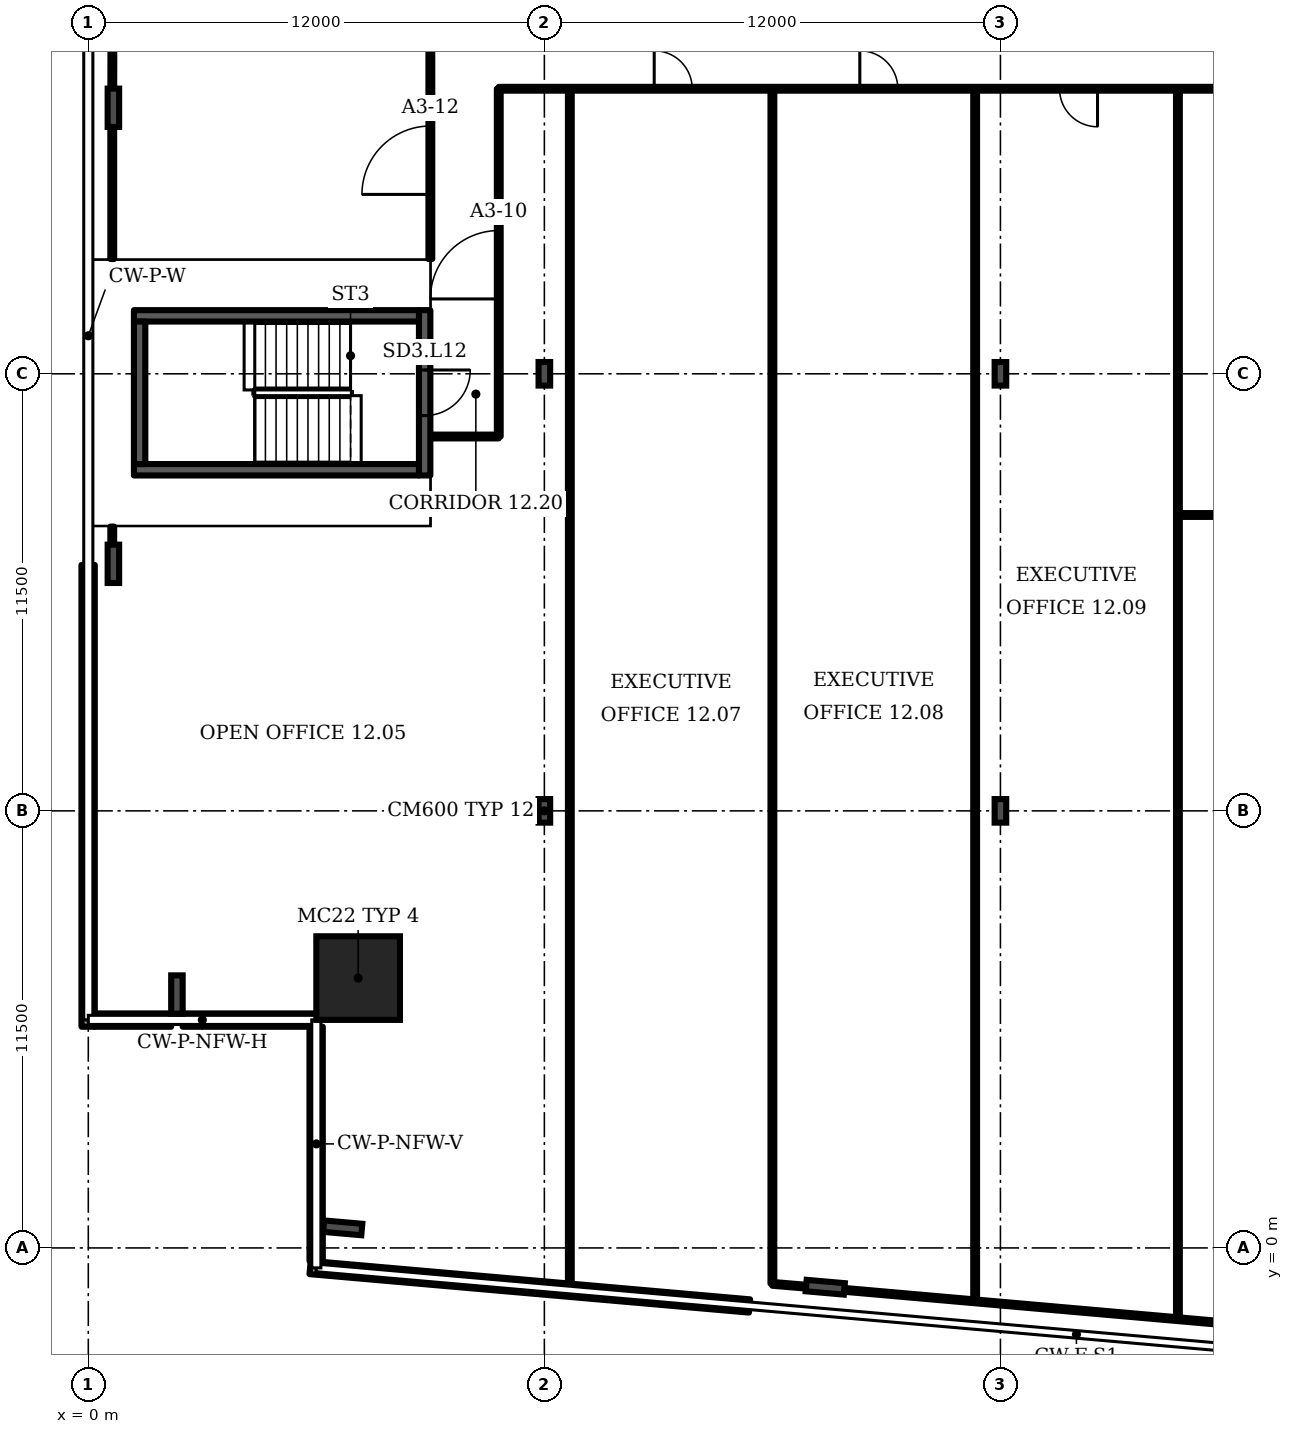
"""IFC4 building model, lengths in metres.
Left out: names, types, materials, properties, quantities, classifications, styles, units other than length and angle.
Written with IfcOpenShell. Run it as: python <this file> out.ifc"""

import sys

from ifc_helpers import new_model, si_unit, direction, frame, frame_2d, origin, origin_2d, place, context, subcontext, project, spatial, rectangle, i_section, extrude, element, fill, save


model = new_model("IFC4")
c1 = context("Model", 3, precision=1e-05, world=origin(), true_north=direction((0.0, 1.0)))
c2 = subcontext(c1, "Body", "Model", "MODEL_VIEW")
j1 = project(units=[si_unit("LENGTHUNIT", "METRE"), si_unit("PLANEANGLEUNIT", "RADIAN")], contexts=[c1])
p1 = place(None, origin())
s1 = spatial("IfcSite", under=j1, at=p1, CompositionType="ELEMENT")
p2 = place(p1, origin())
s2 = spatial("IfcBuilding", under=s1, at=p2, CompositionType="ELEMENT")
p3 = place(p2, frame((0.0, 0.0, 63.1)))
s3 = spatial("IfcBuildingStorey", under=s2, at=p3, CompositionType="ELEMENT", Elevation=63.1)
p4 = place(p3, frame((7.1, 7.1, 0.0), z_axis=(0.0, 0.0, 1.0), x_axis=(1.0, 0.0, 0.0)))
e1 = element("IfcColumn", 1, at=p4, inside=s3, PredefinedType="COLUMN", context=c2, shape_type="SweptSolid", body=[
    extrude(rectangle(XDim=2.2, YDim=2.2, at=origin_2d()), origin(), (0.0, 0.0, 1.0), 3.6),
])
for number, where, z_axis, x_axis in (
    (2, (6.694, 0.529, 0.0), (0.0, 0.0, 1.0), (-0.087, -0.996, 0.0)),
    (3, (19.391, -1.034, 0.0), (0.0, 0.0, 1.0), (-0.087, -0.996, 0.0)),
    (4, (0.66, 30.0, 0.0), (0.0, 0.0, 1.0), (-1.0, 0.0, 0.0)),
    (5, (0.66, 18.0, 0.0), (0.0, 0.0, 1.0), (-1.0, 0.0, 0.0)),
    (6, (2.332, 6.667, 0.0), (0.0, 0.0, 1.0), (-1.0, 0.0, 0.0)),
):
    element("IfcColumn", number, at=place(p3, frame(where, z_axis=z_axis, x_axis=x_axis)), inside=s3, PredefinedType="COLUMN", context=c2, shape_type="SweptSolid", body=[
        extrude(i_section(OverallWidth=0.302, OverallDepth=1.008, WebThickness=0.021, FlangeThickness=0.04, FilletRadius=0.03, at=origin_2d()), origin(), (0.0, 0.0, 1.0), 3.6),
    ])
for number, where, z_axis, x_axis in (
    (7, (12.0, 11.5, 0.0), (0.0, 0.0, 1.0), (1.0, 0.0, 0.0)),
    (8, (24.0, 11.5, 0.0), (0.0, 0.0, 1.0), (1.0, 0.0, 0.0)),
    (9, (12.0, 23.0, 0.0), (0.0, 0.0, 1.0), (1.0, 0.0, 0.0)),
    (10, (24.0, 23.0, 0.0), (0.0, 0.0, 1.0), (1.0, 0.0, 0.0)),
):
    element("IfcColumn", number, at=place(p3, frame(where, z_axis=z_axis, x_axis=x_axis)), inside=s3, PredefinedType="COLUMN", context=c2, shape_type="SweptSolid", body=[
        extrude(i_section(OverallWidth=0.305, OverallDepth=0.62, WebThickness=0.021, FlangeThickness=0.04, FilletRadius=0.027, at=origin_2d()), origin(), (0.0, 0.0, 1.0), 3.6),
    ])
p5 = place(p3, frame((5.835, -0.516, 0.0), z_axis=(0.0, 0.0, 1.0), x_axis=(0.996192, -0.087142, 0.0)))
e11 = element("IfcWall", 11, at=p5, inside=s3, PredefinedType="SOLIDWALL", context=c2, shape_type="SweptSolid", body=[
    extrude(rectangle(XDim=11.607, YDim=0.35, at=frame_2d((5.804, 0.0))), origin(), (0.0, 0.0, 1.0), 1.0),
])
p6 = place(p3, frame((-0.005, 17.97, 0.0), z_axis=(0.0, 0.0, 1.0), x_axis=(0.0, -1.0, 0.0)))
e12 = element("IfcWall", 12, at=p6, inside=s3, PredefinedType="SOLIDWALL", context=c2, shape_type="SweptSolid", body=[
    extrude(rectangle(XDim=12.15, YDim=0.35, at=frame_2d((6.075, 0.0))), origin(), (0.0, 0.0, 1.0), 1.0),
])
p7 = place(p3, frame((0.17, 5.995, 0.0), z_axis=(0.0, 0.0, 1.0), x_axis=(1.0, 0.0, 0.0)))
e13 = element("IfcWall", 13, at=p7, inside=s3, PredefinedType="SOLIDWALL", context=c2, shape_type="SweptSolid", body=[
    extrude(rectangle(XDim=2.011, YDim=0.35, at=frame_2d((1.005, 0.0))), origin(), (0.0, 0.0, 1.0), 1.0),
])
p8 = place(p3, frame((2.483, 5.995, 0.0), z_axis=(0.0, 0.0, 1.0), x_axis=(1.0, 0.0, 0.0)))
e14 = element("IfcWall", 14, at=p8, inside=s3, PredefinedType="SOLIDWALL", context=c2, shape_type="SweptSolid", body=[
    extrude(rectangle(XDim=3.517, YDim=0.35, at=frame_2d((1.759, 0.0))), origin(), (0.0, 0.0, 1.0), 1.0),
])
p9 = place(p3, frame((5.995, 5.82, 0.0), z_axis=(0.0, 0.0, 1.0), x_axis=(0.0, -1.0, 0.0)))
e15 = element("IfcWall", 15, at=p9, inside=s3, PredefinedType="SOLIDWALL", context=c2, shape_type="SweptSolid", body=[
    extrude(rectangle(XDim=6.161, YDim=0.35, at=frame_2d((3.081, 0.0))), origin(), (0.0, 0.0, 1.0), 1.0),
])
p10 = place(p3, frame((8.85, 20.325, 0.0), z_axis=(0.0, 0.0, 1.0), x_axis=(0.0, 1.0, 0.0)))
e16 = element("IfcWall", 16, at=p10, inside=s3, PredefinedType="SHEAR", context=c2, shape_type="SweptSolid", body=[
    extrude(rectangle(XDim=4.35, YDim=0.3, at=frame_2d((2.175, 0.0))), origin(), (0.0, 0.0, 1.0), 3.2),
])
p11 = place(p10, frame((1.575, 0.0, 0.0)))
e17 = element("IfcOpeningElement", 17, at=p11, cuts=e16, PredefinedType="OPENING", context=c2, shape_type="SweptSolid", body=[
    extrude(rectangle(XDim=1.2, YDim=2.1, at=frame_2d((0.6, 1.05))), frame((0.0, 0.16, 0.0), z_axis=(0.0, -1.0, 0.0), x_axis=(1.0, 0.0, 0.0)), (0.0, 0.0, 1.0), 0.32),
])
p12 = place(p3, frame((0.63, 17.5, 0.0), z_axis=(0.0, 0.0, 1.0), x_axis=(0.0, 1.0, 0.0)))
e18 = element("IfcWall", 18, at=p12, inside=s3, PredefinedType="PARTITIONING", context=c2, shape_type="SweptSolid", body=[
    extrude(rectangle(XDim=1.48, YDim=0.1, at=frame_2d((0.74, 0.0))), origin(), (0.0, 0.0, 1.0), 2.58),
])
p13 = place(p3, frame((0.63, 26.02, 0.0), z_axis=(0.0, 0.0, 1.0), x_axis=(0.0, 1.0, 0.0)))
e19 = element("IfcWall", 19, at=p13, inside=s3, PredefinedType="PARTITIONING", context=c2, shape_type="SweptSolid", body=[
    extrude(rectangle(XDim=3.98, YDim=0.1, at=frame_2d((1.99, 0.0))), origin(), (0.0, 0.0, 1.0), 2.58),
])
p14 = place(p3, frame((0.63, 30.0, 0.0), z_axis=(0.0, 0.0, 1.0), x_axis=(0.00218, 0.999994, 0.0)))
e20 = element("IfcWall", 20, at=p14, inside=s3, PredefinedType="PARTITIONING", context=c2, shape_type="SweptSolid", body=[
    extrude(rectangle(XDim=11.535, YDim=0.1, at=frame_2d((5.768, 0.0))), origin(), (0.0, 0.0, 1.0), 2.58),
])
p15 = place(p3, frame((9.0, 26.02, 0.0), z_axis=(0.0, 0.0, 1.0), x_axis=(0.0, 1.0, 0.0)))
e21 = element("IfcWall", 21, at=p15, inside=s3, PredefinedType="PARTITIONING", context=c2, shape_type="SweptSolid", body=[
    extrude(rectangle(XDim=7.96, YDim=0.1, at=frame_2d((3.98, 0.0))), origin(), (0.0, 0.0, 1.0), 3.2),
])
p16 = place(p15, frame((1.7, 0.0, 0.0)))
e22 = element("IfcOpeningElement", 22, at=p16, cuts=e21, PredefinedType="OPENING", context=c2, shape_type="SweptSolid", body=[
    extrude(rectangle(XDim=1.8, YDim=2.1, at=frame_2d((0.9, 1.05))), frame((0.0, 0.06, 0.0), z_axis=(0.0, -1.0, 0.0), x_axis=(1.0, 0.0, 0.0)), (0.0, 0.0, 1.0), 0.12),
])
p17 = place(p3, frame((9.02, 21.35, 0.0), z_axis=(0.0, 0.0, 1.0), x_axis=(1.0, 0.0, 0.0)))
e23 = element("IfcWall", 23, at=p17, inside=s3, PredefinedType="PARTITIONING", context=c2, shape_type="SweptSolid", body=[
    extrude(rectangle(XDim=1.78, YDim=0.1, at=frame_2d((0.89, 0.0))), origin(), (0.0, 0.0, 1.0), 3.2),
])
p18 = place(p3, frame((10.8, 21.35, 0.0), z_axis=(0.0, 0.0, 1.0), x_axis=(0.0, 1.0, 0.0)))
e24 = element("IfcWall", 24, at=p18, inside=s3, PredefinedType="PARTITIONING", context=c2, shape_type="SweptSolid", body=[
    extrude(rectangle(XDim=9.15, YDim=0.1, at=frame_2d((4.575, 0.0))), origin(), (0.0, 0.0, 1.0), 3.2),
])
p19 = place(p18, frame((3.62, 0.0, 0.0)))
e25 = element("IfcOpeningElement", 25, at=p19, cuts=e24, PredefinedType="OPENING", context=c2, shape_type="SweptSolid", body=[
    extrude(rectangle(XDim=1.8, YDim=2.1, at=frame_2d((0.9, 1.05))), frame((0.0, 0.06, 0.0), z_axis=(0.0, -1.0, 0.0), x_axis=(1.0, 0.0, 0.0)), (0.0, 0.0, 1.0), 0.12),
])
p20 = place(p3, frame((10.8, 30.5, 0.0), z_axis=(0.0, 0.0, 1.0), x_axis=(1.0, 0.0, 0.0)))
e26 = element("IfcWall", 26, at=p20, inside=s3, PredefinedType="PARTITIONING", context=c2, shape_type="SweptSolid", body=[
    extrude(rectangle(XDim=26.05, YDim=0.1, at=frame_2d((13.025, 0.0))), origin(), (0.0, 0.0, 1.0), 3.2),
])
p21 = place(p20, frame((4.09, 0.0, 0.0)))
e27 = element("IfcOpeningElement", 27, at=p21, cuts=e26, PredefinedType="OPENING", context=c2, shape_type="SweptSolid", body=[
    extrude(rectangle(XDim=1.0, YDim=2.1, at=frame_2d((0.5, 1.05))), frame((0.0, 0.06, 0.0), z_axis=(0.0, -1.0, 0.0), x_axis=(1.0, 0.0, 0.0)), (0.0, 0.0, 1.0), 0.12),
])
p22 = place(p20, frame((9.5, 0.0, 0.0)))
e28 = element("IfcOpeningElement", 28, at=p22, cuts=e26, PredefinedType="OPENING", context=c2, shape_type="SweptSolid", body=[
    extrude(rectangle(XDim=1.0, YDim=2.1, at=frame_2d((0.5, 1.05))), frame((0.0, 0.06, 0.0), z_axis=(0.0, -1.0, 0.0), x_axis=(1.0, 0.0, 0.0)), (0.0, 0.0, 1.0), 0.12),
])
p23 = place(p20, frame((14.755, 0.0, 0.0)))
e29 = element("IfcOpeningElement", 29, at=p23, cuts=e26, PredefinedType="OPENING", context=c2, shape_type="SweptSolid", body=[
    extrude(rectangle(XDim=1.0, YDim=2.1, at=frame_2d((0.5, 1.05))), frame((0.0, 0.06, 0.0), z_axis=(0.0, -1.0, 0.0), x_axis=(1.0, 0.0, 0.0)), (0.0, 0.0, 1.0), 0.12),
])
p24 = place(p20, frame((21.49, 0.0, 0.0)))
e30 = element("IfcOpeningElement", 30, at=p24, cuts=e26, PredefinedType="OPENING", context=c2, shape_type="SweptSolid", body=[
    extrude(rectangle(XDim=1.0, YDim=2.1, at=frame_2d((0.5, 1.05))), frame((0.0, 0.06, 0.0), z_axis=(0.0, -1.0, 0.0), x_axis=(1.0, 0.0, 0.0)), (0.0, 0.0, 1.0), 0.12),
])
p25 = place(p3, frame((12.67, -1.088, 0.0), z_axis=(0.0, 0.0, 1.0), x_axis=(0.0, 1.0, 0.0)))
e31 = element("IfcWall", 31, at=p25, inside=s3, PredefinedType="PARTITIONING", context=c2, shape_type="SweptSolid", body=[
    extrude(rectangle(XDim=31.588, YDim=0.1, at=frame_2d((15.794, 0.0))), origin(), (0.0, 0.0, 1.0), 3.2),
])
p26 = place(p3, frame((18.0, -0.94, 0.0), z_axis=(0.0, 0.0, 1.0), x_axis=(0.0, 1.0, 0.0)))
e32 = element("IfcWall", 32, at=p26, inside=s3, PredefinedType="PARTITIONING", context=c2, shape_type="SweptSolid", body=[
    extrude(rectangle(XDim=31.44, YDim=0.1, at=frame_2d((15.72, 0.0))), origin(), (0.0, 0.0, 1.0), 3.2),
])
p27 = place(p3, frame((18.89, -1.02, 0.0), z_axis=(0.0, 0.0, 1.0), x_axis=(-0.996474, 0.083928, 0.0)))
e33 = element("IfcWall", 33, at=p27, inside=s3, PredefinedType="PARTITIONING", context=c2, shape_type="SweptSolid", body=[
    extrude(rectangle(XDim=0.893, YDim=0.1, at=frame_2d((0.447, 0.0))), origin(), (0.0, 0.0, 1.0), 3.2),
])
p28 = place(p3, frame((23.335, -1.41, 0.0), z_axis=(0.0, 0.0, 1.0), x_axis=(0.0, 1.0, 0.0)))
e34 = element("IfcWall", 34, at=p28, inside=s3, PredefinedType="PARTITIONING", context=c2, shape_type="SweptSolid", body=[
    extrude(rectangle(XDim=31.91, YDim=0.1, at=frame_2d((15.955, 0.0))), origin(), (0.0, 0.0, 1.0), 3.2),
])
p29 = place(p3, frame((28.67, -1.875, 0.0), z_axis=(0.0, 0.0, 1.0), x_axis=(0.0, 1.0, 0.0)))
e35 = element("IfcWall", 35, at=p29, inside=s3, PredefinedType="PARTITIONING", context=c2, shape_type="SweptSolid", body=[
    extrude(rectangle(XDim=32.375, YDim=0.1, at=frame_2d((16.188, 0.0))), origin(), (0.0, 0.0, 1.0), 3.2),
])
p30 = place(p3, frame((28.67, 19.285, 0.0), z_axis=(0.0, 0.0, 1.0), x_axis=(1.0, 0.0, 0.0)))
e36 = element("IfcWall", 36, at=p30, inside=s3, PredefinedType="PARTITIONING", context=c2, shape_type="SweptSolid", body=[
    extrude(rectangle(XDim=9.81, YDim=0.1, at=frame_2d((4.905, 0.0))), origin(), (0.0, 0.0, 1.0), 3.2),
])
p31 = place(p3, frame((33.22, -2.275, 0.0), z_axis=(0.0, 0.0, 1.0), x_axis=(-0.99616, 0.087559, 0.0)))
e37 = element("IfcWall", 37, at=p31, inside=s3, PredefinedType="PARTITIONING", context=c2, shape_type="SweptSolid", body=[
    extrude(rectangle(XDim=14.385, YDim=0.1, at=frame_2d((7.192, 0.0))), origin(), (0.0, 0.0, 1.0), 2.58),
])
for number, where, z_axis, x_axis in (
    (38, (1.2, 20.475, 0.0), (0.0, 0.0, 1.0), (1.0, 0.0, 0.0)),
    (39, (1.2, 24.525, 0.0), (0.0, 0.0, 1.0), (1.0, 0.0, 0.0)),
):
    element("IfcWall", number, at=place(p3, frame(where, z_axis=z_axis, x_axis=x_axis)), inside=s3, PredefinedType="SHEAR", context=c2, shape_type="SweptSolid", body=[
        extrude(rectangle(XDim=7.5, YDim=0.3, at=frame_2d((3.75, 0.0))), origin(), (0.0, 0.0, 1.0), 3.2),
    ])
p32 = place(p3, frame((1.35, 20.625, 0.0), z_axis=(0.0, 0.0, 1.0), x_axis=(0.0, 1.0, 0.0)))
e40 = element("IfcWall", 40, at=p32, inside=s3, PredefinedType="SHEAR", context=c2, shape_type="SweptSolid", body=[
    extrude(rectangle(XDim=3.75, YDim=0.3, at=frame_2d((1.875, 0.0))), origin(), (0.0, 0.0, 1.0), 3.2),
])
p33 = place(p11, origin())
e41 = element("IfcDoor", 41, at=p33, inside=s3, OperationType="SINGLE_SWING_RIGHT", PredefinedType="DOOR", context=c2, shape_type="SweptSolid", body=[
    extrude(rectangle(XDim=1.2, YDim=2.1, at=frame_2d((0.6, 1.05))), frame((0.0, 0.025, 0.0), z_axis=(0.0, -1.0, 0.0), x_axis=(1.0, 0.0, 0.0)), (0.0, 0.0, 1.0), 0.05),
])
fill(e17, e41)
p34 = place(p19, origin())
e42 = element("IfcDoor", 42, at=p34, inside=s3, OperationType="DOUBLE_DOOR_SINGLE_SWING", PredefinedType="DOOR", context=c2, shape_type="SweptSolid", body=[
    extrude(rectangle(XDim=1.8, YDim=2.1, at=frame_2d((0.9, 1.05))), frame((0.0, 0.025, 0.0), z_axis=(0.0, -1.0, 0.0), x_axis=(1.0, 0.0, 0.0)), (0.0, 0.0, 1.0), 0.05),
])
fill(e25, e42)
p35 = place(p16, origin())
e43 = element("IfcDoor", 43, at=p35, inside=s3, OperationType="DOUBLE_DOOR_SINGLE_SWING", PredefinedType="DOOR", context=c2, shape_type="SweptSolid", body=[
    extrude(rectangle(XDim=1.8, YDim=2.1, at=frame_2d((0.9, 1.05))), frame((0.0, 0.025, 0.0), z_axis=(0.0, -1.0, 0.0), x_axis=(1.0, 0.0, 0.0)), (0.0, 0.0, 1.0), 0.05),
])
fill(e22, e43)
p36 = place(p21, origin())
e44 = element("IfcDoor", 44, at=p36, inside=s3, OperationType="SINGLE_SWING_LEFT", PredefinedType="DOOR", context=c2, shape_type="SweptSolid", body=[
    extrude(rectangle(XDim=1.0, YDim=2.1, at=frame_2d((0.5, 1.05))), frame((0.0, 0.025, 0.0), z_axis=(0.0, -1.0, 0.0), x_axis=(1.0, 0.0, 0.0)), (0.0, 0.0, 1.0), 0.05),
])
fill(e27, e44)
p37 = place(p22, origin())
e45 = element("IfcDoor", 45, at=p37, inside=s3, OperationType="SINGLE_SWING_LEFT", PredefinedType="DOOR", context=c2, shape_type="SweptSolid", body=[
    extrude(rectangle(XDim=1.0, YDim=2.1, at=frame_2d((0.5, 1.05))), frame((0.0, 0.025, 0.0), z_axis=(0.0, -1.0, 0.0), x_axis=(1.0, 0.0, 0.0)), (0.0, 0.0, 1.0), 0.05),
])
fill(e28, e45)
p38 = place(p23, origin())
e46 = element("IfcDoor", 46, at=p38, inside=s3, OperationType="SINGLE_SWING_RIGHT", PredefinedType="DOOR", context=c2, shape_type="SweptSolid", body=[
    extrude(rectangle(XDim=1.0, YDim=2.1, at=frame_2d((0.5, 1.05))), frame((0.0, 0.025, 0.0), z_axis=(0.0, -1.0, 0.0), x_axis=(1.0, 0.0, 0.0)), (0.0, 0.0, 1.0), 0.05),
])
fill(e29, e46)
save(model, sys.argv[1])
